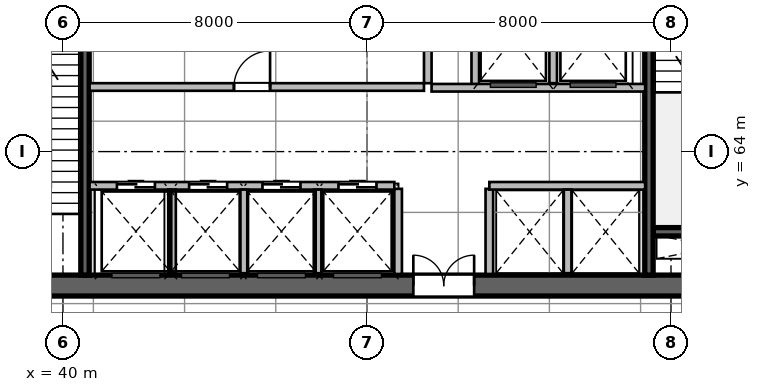
"""IFC4 building model, lengths in metres.
Left out: names, types, materials, properties, quantities, classifications, styles, units other than length and angle.
Written with IfcOpenShell. Run it as: python <this file> out.ifc"""

import sys

from ifc_helpers import new_model, si_unit, direction, frame, frame_2d, origin, place, context, subcontext, project, spatial, rectangle, extrude, source, transform, mapped, element, fill, save


model = new_model("IFC4")
c1 = context("Model", 3, precision=1e-05, world=origin(), true_north=direction((0.0, 1.0)))
c2 = subcontext(c1, "Body", "Model", "MODEL_VIEW")
j1 = project(units=[si_unit("LENGTHUNIT", "METRE"), si_unit("PLANEANGLEUNIT", "RADIAN")], contexts=[c1])
p1 = place(None, origin())
s1 = spatial("IfcSite", under=j1, at=p1, CompositionType="ELEMENT")
p2 = place(p1, origin())
s2 = spatial("IfcBuilding", under=s1, at=p2, CompositionType="ELEMENT")
p3 = place(p2, frame((0.0, 0.0, 6.0)))
s3 = spatial("IfcBuildingStorey", under=s2, at=p3, CompositionType="ELEMENT", Elevation=6.0)
m1 = source(origin(), c2, "Body", "SweptSolid", [
    extrude(rectangle(XDim=21.6, YDim=0.55, at=frame_2d((10.8, 0.0))), origin(), (0.0, 0.0, 1.0), 6.0),
])
p4 = place(p3, frame((37.2, 60.475, 0.0), z_axis=(0.0, 0.0, 1.0), x_axis=(1.0, 0.0, 0.0)))
e1 = element("IfcWall", 1, at=p4, inside=s3, PredefinedType="SHEAR", context=c2, shape_type="MappedRepresentation", body=[
    mapped(m1, transform((0.0, 0.0, 0.0), scale=1.0)),
])
p5 = place(p4, frame((1.1, 0.0, 0.0)))
e2 = element("IfcOpeningElement", 2, at=p5, cuts=e1, PredefinedType="OPENING", context=c2, shape_type="SweptSolid", body=[
    extrude(rectangle(XDim=1.15, YDim=2.15, at=frame_2d((0.575, 1.075))), frame((0.0, 0.285, 0.0), z_axis=(0.0, -1.0, 0.0), x_axis=(1.0, 0.0, 0.0)), (0.0, 0.0, 1.0), 0.57),
])
p6 = place(p4, frame((19.5, 0.0, 0.0)))
e3 = element("IfcOpeningElement", 3, at=p6, cuts=e1, PredefinedType="OPENING", context=c2, shape_type="SweptSolid", body=[
    extrude(rectangle(XDim=0.9, YDim=2.1, at=frame_2d((0.45, 1.05))), frame((0.0, 0.285, 0.0), z_axis=(0.0, -1.0, 0.0), x_axis=(1.0, 0.0, 0.0)), (0.0, 0.0, 1.0), 0.57),
])
p7 = place(p4, frame((12.02, 0.0, 0.0)))
e4 = element("IfcOpeningElement", 4, at=p7, cuts=e1, PredefinedType="OPENING", context=c2, shape_type="SweptSolid", body=[
    extrude(rectangle(XDim=1.6, YDim=2.15, at=frame_2d((0.8, 1.075))), frame((0.0, 0.285, 0.0), z_axis=(0.0, -1.0, 0.0), x_axis=(1.0, 0.0, 0.0)), (0.0, 0.0, 1.0), 0.57),
])
m2 = source(origin(), c2, "Body", "SweptSolid", [
    extrude(rectangle(XDim=3.27, YDim=0.22, at=frame_2d((1.635, 0.0))), origin(), (0.0, 0.0, 1.0), 6.0),
])
p8 = place(p3, frame((55.53, 61.89, 0.0), z_axis=(0.0, 0.0, 1.0), x_axis=(1.0, 0.0, 0.0)))
e5 = element("IfcWall", 5, at=p8, inside=s3, PredefinedType="SHEAR", context=c2, shape_type="MappedRepresentation", body=[
    mapped(m2, transform((0.0, 0.0, 0.0), scale=1.0)),
])
m3 = source(origin(), c2, "Body", "SweptSolid", [
    extrude(rectangle(XDim=10.9, YDim=0.22, at=frame_2d((5.45, 0.0))), origin(), (0.0, 0.0, 1.0), 6.0),
])
p9 = place(p3, frame((40.58, 60.75, 0.0), z_axis=(0.0, 0.0, 1.0), x_axis=(0.0, 1.0, 0.0)))
e6 = element("IfcWall", 6, at=p9, inside=s3, PredefinedType="SHEAR", context=c2, shape_type="MappedRepresentation", body=[
    mapped(m3, transform((0.0, 0.0, 0.0), scale=1.0)),
])
p10 = place(p3, frame((55.42, 60.75, 0.0), z_axis=(0.0, 0.0, 1.0), x_axis=(0.0, 1.0, 0.0)))
e7 = element("IfcWall", 7, at=p10, inside=s3, PredefinedType="SHEAR", context=c2, shape_type="MappedRepresentation", body=[
    mapped(m3, transform((0.0, 0.0, 0.0), scale=1.0)),
])
p11 = place(p10, frame((9.495, 0.0, 0.0)))
e8 = element("IfcOpeningElement", 8, at=p11, cuts=e7, PredefinedType="OPENING", context=c2, shape_type="SweptSolid", body=[
    extrude(rectangle(XDim=1.15, YDim=2.15, at=frame_2d((0.575, 1.075))), frame((0.0, 0.12, 0.0), z_axis=(0.0, -1.0, 0.0), x_axis=(1.0, 0.0, 0.0)), (0.0, 0.0, 1.0), 0.24),
])
m4 = source(origin(), c2, "Body", "SweptSolid", [
    extrude(rectangle(XDim=2.24, YDim=0.2, at=frame_2d((1.12, 0.0))), origin(), (0.0, 0.0, 1.0), 5.7),
])
for number, where, z_axis, x_axis in (
    (9, (48.82, 60.78, 0.0), (0.0, 0.0, 1.0), (0.0, 1.0, 0.0)),
    (10, (51.22, 60.78, 0.0), (0.0, 0.0, 1.0), (0.0, 1.0, 0.0)),
):
    element("IfcWall", number, at=place(p3, frame(where, z_axis=z_axis, x_axis=x_axis)), inside=s3, PredefinedType="SOLIDWALL", context=c2, shape_type="MappedRepresentation", body=[
        mapped(m4, transform((0.0, 0.0, 0.0), scale=1.0)),
    ])
m5 = source(origin(), c2, "Body", "SweptSolid", [
    extrude(rectangle(XDim=5.8, YDim=0.2, at=frame_2d((2.9, 0.0))), origin(), (0.0, 0.0, 1.0), 5.7),
])
p12 = place(p3, frame((49.6, 65.8, 0.0), z_axis=(0.0, 0.0, 1.0), x_axis=(0.0, 1.0, 0.0)))
e11 = element("IfcWall", 11, at=p12, inside=s3, PredefinedType="SOLIDWALL", context=c2, shape_type="MappedRepresentation", body=[
    mapped(m5, transform((0.0, 0.0, 0.0), scale=1.0)),
])
m6 = source(origin(), c2, "Body", "SweptSolid", [
    extrude(rectangle(XDim=2.58, YDim=0.2, at=frame_2d((1.29, 0.0))), origin(), (0.0, 0.0, 1.0), 5.7),
])
p13 = place(p3, frame((50.85, 65.68, 0.0), z_axis=(0.0, 0.0, 1.0), x_axis=(0.0, 1.0, 0.0)))
e12 = element("IfcWall", 12, at=p13, inside=s3, PredefinedType="SOLIDWALL", context=c2, shape_type="MappedRepresentation", body=[
    mapped(m6, transform((0.0, 0.0, 0.0), scale=1.0)),
])
m7 = source(origin(), c2, "Body", "SweptSolid", [
    extrude(rectangle(XDim=2.4, YDim=0.2, at=frame_2d((1.2, 0.0))), origin(), (0.0, 0.0, 1.0), 5.7),
])
p14 = place(p3, frame((52.9, 65.8, 0.0), z_axis=(0.0, 0.0, 1.0), x_axis=(0.0, 1.0, 0.0)))
e13 = element("IfcWall", 13, at=p14, inside=s3, PredefinedType="SOLIDWALL", context=c2, shape_type="MappedRepresentation", body=[
    mapped(m7, transform((0.0, 0.0, 0.0), scale=1.0)),
])
m8 = source(origin(), c2, "Body", "SweptSolid", [
    extrude(rectangle(XDim=5.62, YDim=0.2, at=frame_2d((2.81, 0.0))), origin(), (0.0, 0.0, 1.0), 5.7),
])
p15 = place(p3, frame((49.7, 65.68, 0.0), z_axis=(0.0, 0.0, 1.0), x_axis=(1.0, 0.0, 0.0)))
e14 = element("IfcWall", 14, at=p15, inside=s3, PredefinedType="SOLIDWALL", context=c2, shape_type="MappedRepresentation", body=[
    mapped(m8, transform((0.0, 0.0, 0.0), scale=1.0)),
])
m9 = source(origin(), c2, "Body", "SweptSolid", [
    extrude(rectangle(XDim=8.02, YDim=0.2, at=frame_2d((4.01, 0.0))), origin(), (0.0, 0.0, 1.0), 5.7),
])
p16 = place(p3, frame((40.7, 63.1, 0.0), z_axis=(0.0, 0.0, 1.0), x_axis=(1.0, 0.0, 0.0)))
e15 = element("IfcWall", 15, at=p16, inside=s3, PredefinedType="SOLIDWALL", context=c2, shape_type="MappedRepresentation", body=[
    mapped(m9, transform((0.0, 0.0, 0.0), scale=1.0)),
])
p17 = place(p16, frame((0.72, 0.0, 0.0)))
e16 = element("IfcOpeningElement", 16, at=p17, cuts=e15, PredefinedType="OPENING", context=c2, shape_type="SweptSolid", body=[
    extrude(rectangle(XDim=1.0, YDim=2.15, at=frame_2d((0.5, 1.075))), frame((0.0, 0.11, 0.0), z_axis=(0.0, -1.0, 0.0), x_axis=(1.0, 0.0, 0.0)), (0.0, 0.0, 1.0), 0.22),
])
p18 = place(p16, frame((2.62, 0.0, 0.0)))
e17 = element("IfcOpeningElement", 17, at=p18, cuts=e15, PredefinedType="OPENING", context=c2, shape_type="SweptSolid", body=[
    extrude(rectangle(XDim=1.0, YDim=2.15, at=frame_2d((0.5, 1.075))), frame((0.0, 0.11, 0.0), z_axis=(0.0, -1.0, 0.0), x_axis=(1.0, 0.0, 0.0)), (0.0, 0.0, 1.0), 0.22),
])
p19 = place(p16, frame((4.55, 0.0, 0.0)))
e18 = element("IfcOpeningElement", 18, at=p19, cuts=e15, PredefinedType="OPENING", context=c2, shape_type="SweptSolid", body=[
    extrude(rectangle(XDim=1.0, YDim=2.15, at=frame_2d((0.5, 1.075))), frame((0.0, 0.11, 0.0), z_axis=(0.0, -1.0, 0.0), x_axis=(1.0, 0.0, 0.0)), (0.0, 0.0, 1.0), 0.22),
])
p20 = place(p16, frame((6.55, 0.0, 0.0)))
e19 = element("IfcOpeningElement", 19, at=p20, cuts=e15, PredefinedType="OPENING", context=c2, shape_type="SweptSolid", body=[
    extrude(rectangle(XDim=1.0, YDim=2.15, at=frame_2d((0.5, 1.075))), frame((0.0, 0.11, 0.0), z_axis=(0.0, -1.0, 0.0), x_axis=(1.0, 0.0, 0.0)), (0.0, 0.0, 1.0), 0.22),
])
m10 = source(origin(), c2, "Body", "SweptSolid", [
    extrude(rectangle(XDim=4.1, YDim=0.2, at=frame_2d((2.05, 0.0))), origin(), (0.0, 0.0, 1.0), 5.7),
])
p21 = place(p3, frame((51.22, 63.1, 0.0), z_axis=(0.0, 0.0, 1.0), x_axis=(1.0, 0.0, 0.0)))
e20 = element("IfcWall", 20, at=p21, inside=s3, PredefinedType="SOLIDWALL", context=c2, shape_type="MappedRepresentation", body=[
    mapped(m10, transform((0.0, 0.0, 0.0), scale=1.0)),
])
m11 = source(origin(), c2, "Body", "SweptSolid", [
    extrude(rectangle(XDim=2.2, YDim=0.2, at=frame_2d((1.1, 0.0))), origin(), (0.0, 0.0, 1.0), 5.7),
])
for number, where, z_axis, x_axis in (
    (21, (42.87, 60.8, 0.0), (0.0, 0.0, 1.0), (0.0, 1.0, 0.0)),
    (22, (44.77, 60.8, 0.0), (0.0, 0.0, 1.0), (0.0, 1.0, 0.0)),
    (23, (46.7, 60.8, 0.0), (0.0, 0.0, 1.0), (0.0, 1.0, 0.0)),
    (24, (53.28, 60.8, 0.0), (0.0, 0.0, 1.0), (0.0, 1.0, 0.0)),
):
    element("IfcWall", number, at=place(p3, frame(where, z_axis=z_axis, x_axis=x_axis)), inside=s3, PredefinedType="SOLIDWALL", context=c2, shape_type="MappedRepresentation", body=[
        mapped(m11, transform((0.0, 0.0, 0.0), scale=1.0)),
    ])
m12 = source(origin(), c2, "Body", "SweptSolid", [
    extrude(rectangle(XDim=8.8, YDim=0.2, at=frame_2d((4.4, 0.0))), origin(), (0.0, 0.0, 1.0), 5.7),
])
p22 = place(p3, frame((40.7, 65.7, 0.0), z_axis=(0.0, 0.0, 1.0), x_axis=(1.0, 0.0, 0.0)))
e25 = element("IfcWall", 25, at=p22, inside=s3, PredefinedType="SOLIDWALL", context=c2, shape_type="MappedRepresentation", body=[
    mapped(m12, transform((0.0, 0.0, 0.0), scale=1.0)),
])
p23 = place(p22, frame((3.8, 0.0, 0.0)))
e26 = element("IfcOpeningElement", 26, at=p23, cuts=e25, PredefinedType="OPENING", context=c2, shape_type="SweptSolid", body=[
    extrude(rectangle(XDim=0.95, YDim=2.15, at=frame_2d((0.475, 1.075))), frame((0.0, 0.11, 0.0), z_axis=(0.0, -1.0, 0.0), x_axis=(1.0, 0.0, 0.0)), (0.0, 0.0, 1.0), 0.22),
])
m13 = source(origin(), c2, "Body", "SweptSolid", [
    extrude(rectangle(XDim=1.6, YDim=2.15, at=frame_2d((0.8, 1.075))), frame((0.0, 0.025, 0.0), z_axis=(0.0, -1.0, 0.0), x_axis=(1.0, 0.0, 0.0)), (0.0, 0.0, 1.0), 0.05),
])
p24 = place(p7, origin())
e27 = element("IfcDoor", 27, at=p24, inside=s3, OperationType="DOUBLE_DOOR_SINGLE_SWING", PredefinedType="DOOR", context=c2, shape_type="MappedRepresentation", body=[
    mapped(m13, transform((0.0, 0.0, 0.0), scale=1.0)),
])
fill(e4, e27)
m14 = source(origin(), c2, "Body", "SweptSolid", [
    extrude(rectangle(XDim=1.0, YDim=2.15, at=frame_2d((0.5, 1.075))), frame((0.0, 0.025, 0.0), z_axis=(0.0, -1.0, 0.0), x_axis=(1.0, 0.0, 0.0)), (0.0, 0.0, 1.0), 0.05),
])
p25 = place(p17, origin())
e28 = element("IfcDoor", 28, at=p25, inside=s3, OperationType="DOUBLE_DOOR_SLIDING", PredefinedType="DOOR", context=c2, shape_type="MappedRepresentation", body=[
    mapped(m14, transform((0.0, 0.0, 0.0), scale=1.0)),
])
fill(e16, e28)
p26 = place(p18, origin())
e29 = element("IfcDoor", 29, at=p26, inside=s3, OperationType="DOUBLE_DOOR_SLIDING", PredefinedType="DOOR", context=c2, shape_type="MappedRepresentation", body=[
    mapped(m14, transform((0.0, 0.0, 0.0), scale=1.0)),
])
fill(e17, e29)
p27 = place(p19, origin())
e30 = element("IfcDoor", 30, at=p27, inside=s3, OperationType="DOUBLE_DOOR_SLIDING", PredefinedType="DOOR", context=c2, shape_type="MappedRepresentation", body=[
    mapped(m14, transform((0.0, 0.0, 0.0), scale=1.0)),
])
fill(e18, e30)
p28 = place(p20, origin())
e31 = element("IfcDoor", 31, at=p28, inside=s3, OperationType="DOUBLE_DOOR_SLIDING", PredefinedType="DOOR", context=c2, shape_type="MappedRepresentation", body=[
    mapped(m14, transform((0.0, 0.0, 0.0), scale=1.0)),
])
fill(e19, e31)
m15 = source(origin(), c2, "Body", "SweptSolid", [
    extrude(rectangle(XDim=0.95, YDim=2.15, at=frame_2d((0.475, 1.075))), frame((0.0, 0.025, 0.0), z_axis=(0.0, -1.0, 0.0), x_axis=(1.0, 0.0, 0.0)), (0.0, 0.0, 1.0), 0.05),
])
p29 = place(p23, origin())
e32 = element("IfcDoor", 32, at=p29, inside=s3, OperationType="SINGLE_SWING_RIGHT", PredefinedType="DOOR", context=c2, shape_type="MappedRepresentation", body=[
    mapped(m15, transform((0.0, 0.0, 0.0), scale=1.0)),
])
fill(e26, e32)
save(model, sys.argv[1])
